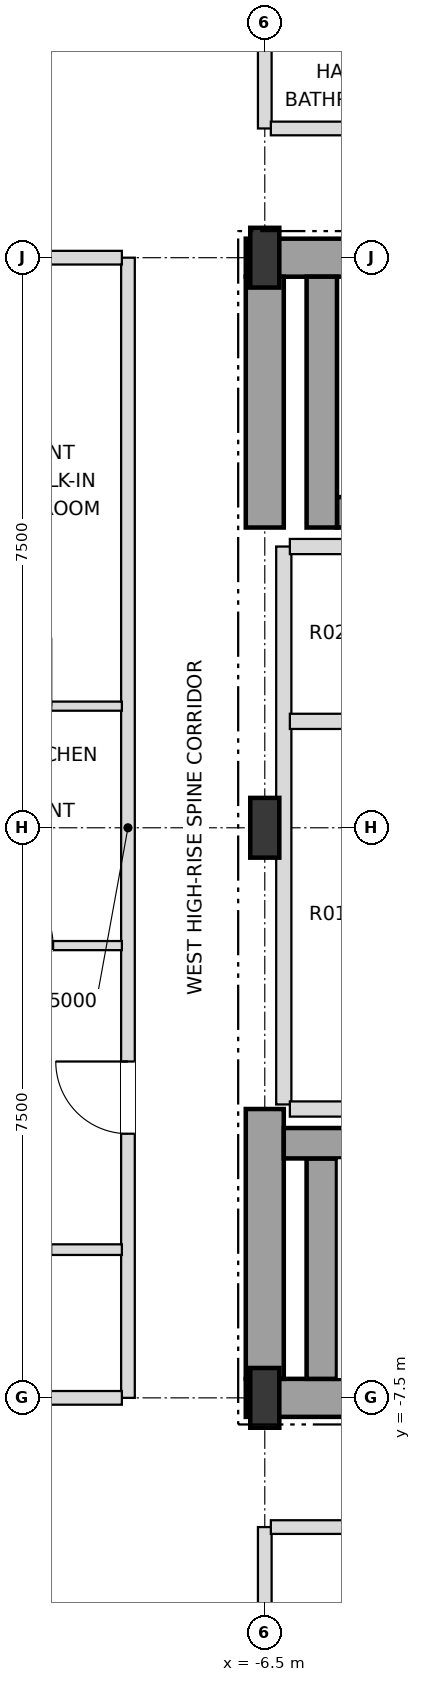
"""IFC4 building model, lengths in metres.
Left out: names, types, materials, properties, quantities, classifications, styles, units other than length and angle.
Written with IfcOpenShell. Run it as: python <this file> out.ifc"""

import sys

from ifc_helpers import new_model, si_unit, direction, frame, frame_2d, origin, origin_2d, place, context, subcontext, project, spatial, rectangle, i_section, extrude, element, fill, save


model = new_model("IFC4")
c1 = context("Model", 3, precision=1e-05, world=origin(), true_north=direction((0.0, 1.0)))
c2 = subcontext(c1, "Body", "Model", "MODEL_VIEW")
j1 = project(units=[si_unit("LENGTHUNIT", "METRE"), si_unit("PLANEANGLEUNIT", "RADIAN")], contexts=[c1])
p1 = place(None, origin())
s1 = spatial("IfcSite", under=j1, at=p1, CompositionType="ELEMENT")
p2 = place(p1, origin())
s2 = spatial("IfcBuilding", under=s1, at=p2, CompositionType="ELEMENT")
p3 = place(p2, frame((0.0, 0.0, 222.3)))
s3 = spatial("IfcBuildingStorey", under=s2, at=p3, CompositionType="ELEMENT", Elevation=222.3)
for number, where, z_axis, x_axis in (
    (1, (-6.5, -7.5, 0.0), (0.0, 0.0, 1.0), (1.0, 0.0, 0.0)),
    (2, (-6.5, 0.0, 0.0), (0.0, 0.0, 1.0), (1.0, 0.0, 0.0)),
    (3, (-6.5, 7.5, 0.0), (0.0, 0.0, 1.0), (1.0, 0.0, 0.0)),
):
    element("IfcColumn", number, at=place(p3, frame(where, z_axis=z_axis, x_axis=x_axis)), inside=s3, PredefinedType="COLUMN", context=c2, shape_type="SweptSolid", body=[
        extrude(i_section(OverallWidth=0.382, OverallDepth=0.786, WebThickness=0.02, FlangeThickness=0.033, at=origin_2d()), origin(), (0.0, 0.0, 1.0), 3.6),
    ])
p4 = place(p3, frame((-6.75, -7.5, 0.0), z_axis=(0.0, 0.0, 1.0), x_axis=(1.0, 0.0, 0.0)))
e4 = element("IfcWall", 4, at=p4, inside=s3, PredefinedType="SHEAR", context=c2, shape_type="SweptSolid", body=[
    extrude(rectangle(XDim=6.75, YDim=0.5, at=frame_2d((3.375, 0.0))), origin(), (0.0, 0.0, 1.0), 3.38),
])
p5 = place(p3, frame((-6.75, 7.5, 0.0), z_axis=(0.0, 0.0, 1.0), x_axis=(1.0, 0.0, 0.0)))
e5 = element("IfcWall", 5, at=p5, inside=s3, PredefinedType="SHEAR", context=c2, shape_type="SweptSolid", body=[
    extrude(rectangle(XDim=6.75, YDim=0.5, at=frame_2d((3.375, 0.0))), origin(), (0.0, 0.0, 1.0), 3.38),
])
p6 = place(p5, frame((1.65, 0.0, 0.0)))
e6 = element("IfcOpeningElement", 6, at=p6, cuts=e5, PredefinedType="OPENING", context=c2, shape_type="SweptSolid", body=[
    extrude(rectangle(XDim=1.05, YDim=2.15, at=frame_2d((0.525, 1.075))), frame((0.0, 0.26, 0.0), z_axis=(0.0, -1.0, 0.0), x_axis=(1.0, 0.0, 0.0)), (0.0, 0.0, 1.0), 0.52),
])
p7 = place(p3, frame((-6.5, -7.25, 0.0), z_axis=(0.0, 0.0, 1.0), x_axis=(0.0, 1.0, 0.0)))
e7 = element("IfcWall", 7, at=p7, inside=s3, PredefinedType="SHEAR", context=c2, shape_type="SweptSolid", body=[
    extrude(rectangle(XDim=3.55, YDim=0.5, at=frame_2d((1.775, 0.0))), origin(), (0.0, 0.0, 1.0), 3.38),
])
p8 = place(p3, frame((-6.5, 3.95, 0.0), z_axis=(0.0, 0.0, 1.0), x_axis=(0.0, 1.0, 0.0)))
e8 = element("IfcWall", 8, at=p8, inside=s3, PredefinedType="SHEAR", context=c2, shape_type="SweptSolid", body=[
    extrude(rectangle(XDim=3.3, YDim=0.5, at=frame_2d((1.65, 0.0))), origin(), (0.0, 0.0, 1.0), 3.38),
])
p9 = place(p3, frame((-5.75, -7.25, 0.0), z_axis=(0.0, 0.0, 1.0), x_axis=(0.0, 1.0, 0.0)))
e9 = element("IfcWall", 9, at=p9, inside=s3, PredefinedType="SHEAR", context=c2, shape_type="SweptSolid", body=[
    extrude(rectangle(XDim=2.9, YDim=0.4, at=frame_2d((1.45, 0.0))), origin(), (0.0, 0.0, 1.0), 3.38),
])
p10 = place(p3, frame((-6.25, -4.15, 0.0), z_axis=(0.0, 0.0, 1.0), x_axis=(1.0, 0.0, 0.0)))
e10 = element("IfcWall", 10, at=p10, inside=s3, PredefinedType="SHEAR", context=c2, shape_type="SweptSolid", body=[
    extrude(rectangle(XDim=7.78, YDim=0.4, at=frame_2d((3.89, 0.0))), origin(), (0.0, 0.0, 1.0), 3.38),
])
p11 = place(p3, frame((-5.55, 4.15, 0.0), z_axis=(0.0, 0.0, 1.0), x_axis=(1.0, 0.0, 0.0)))
e11 = element("IfcWall", 11, at=p11, inside=s3, PredefinedType="SHEAR", context=c2, shape_type="SweptSolid", body=[
    extrude(rectangle(XDim=7.08, YDim=0.4, at=frame_2d((3.54, 0.0))), origin(), (0.0, 0.0, 1.0), 3.38),
])
p12 = place(p3, frame((-5.75, 3.95, 0.0), z_axis=(0.0, 0.0, 1.0), x_axis=(0.0, 1.0, 0.0)))
e12 = element("IfcWall", 12, at=p12, inside=s3, PredefinedType="SHEAR", context=c2, shape_type="SweptSolid", body=[
    extrude(rectangle(XDim=3.3, YDim=0.4, at=frame_2d((1.65, 0.0))), origin(), (0.0, 0.0, 1.0), 3.38),
])
p13 = place(p3, frame((-8.3, -7.5, 0.0), z_axis=(0.0, 0.0, 1.0), x_axis=(0.0, 1.0, 0.0)))
e13 = element("IfcWall", 13, at=p13, inside=s3, PredefinedType="PARTITIONING", context=c2, shape_type="SweptSolid", body=[
    extrude(rectangle(XDim=15.0, YDim=0.18, at=frame_2d((7.5, 0.0))), origin(), (0.0, 0.0, 1.0), 3.38),
])
p14 = place(p13, frame((3.475, 0.0, 0.0)))
e14 = element("IfcOpeningElement", 14, at=p14, cuts=e13, PredefinedType="OPENING", context=c2, shape_type="SweptSolid", body=[
    extrude(rectangle(XDim=0.95, YDim=2.15, at=frame_2d((0.475, 1.075))), frame((0.0, 0.1, 0.0), z_axis=(0.0, -1.0, 0.0), x_axis=(1.0, 0.0, 0.0)), (0.0, 0.0, 1.0), 0.2),
])
for number, where, z_axis, x_axis in (
    (15, (-6.5, -19.9, 0.0), (0.0, 0.0, 1.0), (0.0, 1.0, 0.0)),
    (16, (-6.5, 9.2, 0.0), (0.0, 0.0, 1.0), (0.0, 1.0, 0.0)),
):
    element("IfcWall", number, at=place(p3, frame(where, z_axis=z_axis, x_axis=x_axis)), inside=s3, PredefinedType="PARTITIONING", context=c2, shape_type="SweptSolid", body=[
        extrude(rectangle(XDim=10.7, YDim=0.18, at=frame_2d((5.35, 0.0))), origin(), (0.0, 0.0, 1.0), 2.826),
    ])
p15 = place(p3, frame((-6.25, -3.64, 0.0), z_axis=(0.0, 0.0, 1.0), x_axis=(0.0, 1.0, 0.0)))
e17 = element("IfcWall", 17, at=p15, inside=s3, PredefinedType="SOLIDWALL", context=c2, shape_type="SweptSolid", body=[
    extrude(rectangle(XDim=7.34, YDim=0.2, at=frame_2d((3.67, 0.0))), origin(), (0.0, 0.0, 1.0), 3.38),
])
p16 = place(p3, frame((-6.42, -9.2, 0.0), z_axis=(0.0, 0.0, 1.0), x_axis=(1.0, 0.0, 0.0)))
e18 = element("IfcWall", 18, at=p16, inside=s3, PredefinedType="PARTITIONING", context=c2, shape_type="SweptSolid", body=[
    extrude(rectangle(XDim=6.34, YDim=0.18, at=frame_2d((3.17, 0.0))), origin(), (0.0, 0.0, 1.0), 3.38),
])
p17 = place(p16, frame((2.745, 0.0, 0.0)))
e19 = element("IfcOpeningElement", 19, at=p17, cuts=e18, PredefinedType="OPENING", context=c2, shape_type="SweptSolid", body=[
    extrude(rectangle(XDim=0.95, YDim=2.15, at=frame_2d((0.475, 1.075))), frame((0.0, 0.1, 0.0), z_axis=(0.0, -1.0, 0.0), x_axis=(1.0, 0.0, 0.0)), (0.0, 0.0, 1.0), 0.2),
])
p18 = place(p3, frame((-11.12, -7.5, 0.0), z_axis=(0.0, 0.0, 1.0), x_axis=(1.0, 0.0, 0.0)))
e20 = element("IfcWall", 20, at=p18, inside=s3, PredefinedType="PARTITIONING", context=c2, shape_type="SweptSolid", body=[
    extrude(rectangle(XDim=2.74, YDim=0.18, at=frame_2d((1.37, 0.0))), origin(), (0.0, 0.0, 1.0), 2.826),
])
p19 = place(p3, frame((-11.12, -5.55, 0.0), z_axis=(0.0, 0.0, 1.0), x_axis=(1.0, 0.0, 0.0)))
e21 = element("IfcWall", 21, at=p19, inside=s3, PredefinedType="PARTITIONING", context=c2, shape_type="SweptSolid", body=[
    extrude(rectangle(XDim=2.74, YDim=0.14, at=frame_2d((1.37, 0.0))), origin(), (0.0, 0.0, 1.0), 3.38),
])
p20 = place(p19, frame((0.91, 0.0, 0.0)))
e22 = element("IfcOpeningElement", 22, at=p20, cuts=e21, PredefinedType="OPENING", context=c2, shape_type="SweptSolid", body=[
    extrude(rectangle(XDim=0.9, YDim=2.1, at=frame_2d((0.45, 1.05))), frame((0.0, 0.08, 0.0), z_axis=(0.0, -1.0, 0.0), x_axis=(1.0, 0.0, 0.0)), (0.0, 0.0, 1.0), 0.16),
])
p21 = place(p3, frame((-6.17, -3.7, 0.0), z_axis=(0.0, 0.0, 1.0), x_axis=(1.0, 0.0, 0.0)))
e23 = element("IfcWall", 23, at=p21, inside=s3, PredefinedType="SOLIDWALL", context=c2, shape_type="SweptSolid", body=[
    extrude(rectangle(XDim=1.94, YDim=0.2, at=frame_2d((0.97, 0.0))), origin(), (0.0, 0.0, 1.0), 3.38),
])
p22 = place(p3, frame((-11.12, -1.55, 0.0), z_axis=(0.0, 0.0, 1.0), x_axis=(1.0, 0.0, 0.0)))
e24 = element("IfcWall", 24, at=p22, inside=s3, PredefinedType="PARTITIONING", context=c2, shape_type="SweptSolid", body=[
    extrude(rectangle(XDim=2.74, YDim=0.12, at=frame_2d((1.37, 0.0))), origin(), (0.0, 0.0, 1.0), 3.38),
])
p23 = place(p22, frame((0.885, 0.0, 0.0)))
e25 = element("IfcOpeningElement", 25, at=p23, cuts=e24, PredefinedType="OPENING", context=c2, shape_type="SweptSolid", body=[
    extrude(rectangle(XDim=0.95, YDim=2.1, at=frame_2d((0.475, 1.05))), frame((0.0, 0.07, 0.0), z_axis=(0.0, -1.0, 0.0), x_axis=(1.0, 0.0, 0.0)), (0.0, 0.0, 1.0), 0.14),
])
p24 = place(p3, frame((-6.17, 1.4, 0.0), z_axis=(0.0, 0.0, 1.0), x_axis=(1.0, 0.0, 0.0)))
e26 = element("IfcWall", 26, at=p24, inside=s3, PredefinedType="SOLIDWALL", context=c2, shape_type="SweptSolid", body=[
    extrude(rectangle(XDim=1.94, YDim=0.2, at=frame_2d((0.97, 0.0))), origin(), (0.0, 0.0, 1.0), 3.38),
])
p25 = place(p3, frame((-11.12, 1.6, 0.0), z_axis=(0.0, 0.0, 1.0), x_axis=(1.0, 0.0, 0.0)))
e27 = element("IfcWall", 27, at=p25, inside=s3, PredefinedType="PARTITIONING", context=c2, shape_type="SweptSolid", body=[
    extrude(rectangle(XDim=2.74, YDim=0.12, at=frame_2d((1.37, 0.0))), origin(), (0.0, 0.0, 1.0), 3.38),
])
p26 = place(p25, frame((0.91, 0.0, 0.0)))
e28 = element("IfcOpeningElement", 28, at=p26, cuts=e27, PredefinedType="OPENING", context=c2, shape_type="SweptSolid", body=[
    extrude(rectangle(XDim=0.9, YDim=2.1, at=frame_2d((0.45, 1.05))), frame((0.0, 0.07, 0.0), z_axis=(0.0, -1.0, 0.0), x_axis=(1.0, 0.0, 0.0)), (0.0, 0.0, 1.0), 0.14),
])
p27 = place(p3, frame((-6.17, 3.7, 0.0), z_axis=(0.0, 0.0, 1.0), x_axis=(1.0, 0.0, 0.0)))
e29 = element("IfcWall", 29, at=p27, inside=s3, PredefinedType="SOLIDWALL", context=c2, shape_type="SweptSolid", body=[
    extrude(rectangle(XDim=1.94, YDim=0.2, at=frame_2d((0.97, 0.0))), origin(), (0.0, 0.0, 1.0), 3.38),
])
p28 = place(p3, frame((-11.12, 7.5, 0.0), z_axis=(0.0, 0.0, 1.0), x_axis=(1.0, 0.0, 0.0)))
e30 = element("IfcWall", 30, at=p28, inside=s3, PredefinedType="PARTITIONING", context=c2, shape_type="SweptSolid", body=[
    extrude(rectangle(XDim=2.74, YDim=0.18, at=frame_2d((1.37, 0.0))), origin(), (0.0, 0.0, 1.0), 2.826),
])
p29 = place(p3, frame((-6.42, 9.2, 0.0), z_axis=(0.0, 0.0, 1.0), x_axis=(1.0, 0.0, 0.0)))
e31 = element("IfcWall", 31, at=p29, inside=s3, PredefinedType="PARTITIONING", context=c2, shape_type="SweptSolid", body=[
    extrude(rectangle(XDim=1.79, YDim=0.18, at=frame_2d((0.895, 0.0))), origin(), (0.0, 0.0, 1.0), 3.38),
])
p30 = place(p14, origin())
e32 = element("IfcDoor", 32, at=p30, inside=s3, OperationType="SINGLE_SWING_RIGHT", PredefinedType="DOOR", context=c2, shape_type="SweptSolid", body=[
    extrude(rectangle(XDim=0.95, YDim=2.15, at=frame_2d((0.475, 1.075))), frame((0.0, 0.025, 0.0), z_axis=(0.0, -1.0, 0.0), x_axis=(1.0, 0.0, 0.0)), (0.0, 0.0, 1.0), 0.05),
])
fill(e14, e32)
p31 = place(p23, origin())
e33 = element("IfcDoor", 33, at=p31, inside=s3, OperationType="SINGLE_SWING_LEFT", PredefinedType="DOOR", context=c2, shape_type="SweptSolid", body=[
    extrude(rectangle(XDim=0.95, YDim=2.1, at=frame_2d((0.475, 1.05))), frame((0.0, 0.025, 0.0), z_axis=(0.0, -1.0, 0.0), x_axis=(1.0, 0.0, 0.0)), (0.0, 0.0, 1.0), 0.05),
])
fill(e25, e33)
save(model, sys.argv[1])
